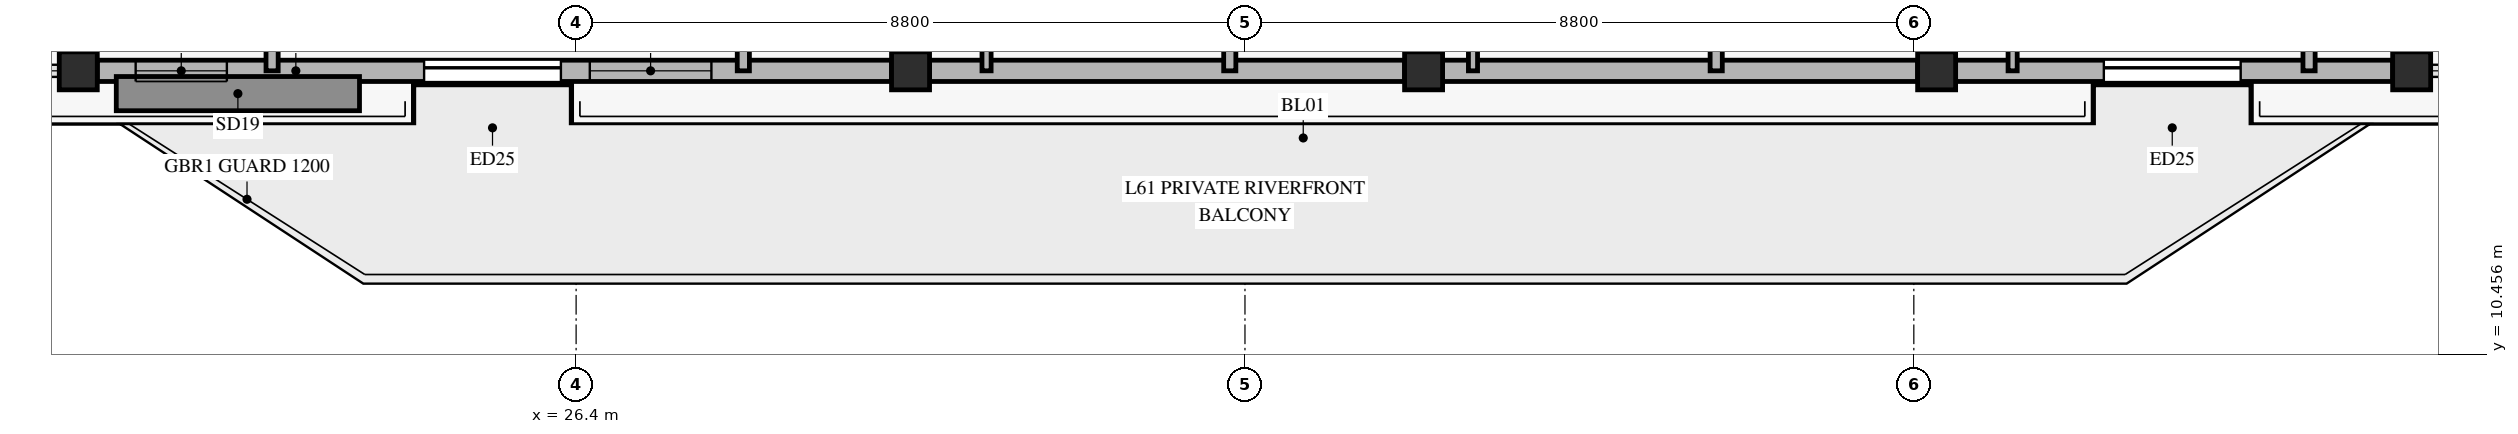
"""IFC4 building model, lengths in metres.
Left out: names, types, materials, properties, quantities, classifications, styles, units other than length and angle.
Written with IfcOpenShell. Run it as: python <this file> out.ifc"""

import sys

from ifc_helpers import new_model, si_unit, direction, frame, frame_2d, origin, origin_2d, place, context, subcontext, project, spatial, rectangle, hollow_rectangle, extrude, source, transform, mapped, element, fill, save


model = new_model("IFC4")
c1 = context("Model", 3, precision=1e-05, world=origin(), true_north=direction((0.0, 1.0)))
c2 = subcontext(c1, "Body", "Model", "MODEL_VIEW")
j1 = project(units=[si_unit("LENGTHUNIT", "METRE"), si_unit("PLANEANGLEUNIT", "RADIAN")], contexts=[c1])
p1 = place(None, origin())
s1 = spatial("IfcSite", under=j1, at=p1, CompositionType="ELEMENT")
p2 = place(p1, origin())
s2 = spatial("IfcBuilding", under=s1, at=p2, CompositionType="ELEMENT")
p3 = place(p2, frame((0.0, 0.0, 241.7)))
s3 = spatial("IfcBuildingStorey", under=s2, at=p3, CompositionType="ELEMENT", Elevation=241.7)
m1 = source(origin(), c2, "Body", "SweptSolid", [
    extrude(hollow_rectangle(XDim=0.5, YDim=0.5, WallThickness=0.024, at=origin_2d()), origin(), (0.0, 0.0, 1.0), 3.185),
])
for number, where, z_axis, x_axis in (
    (1, (19.85, 14.182, 0.0), (0.0, 0.0, 1.0), (1.0, 0.0, 0.0)),
    (2, (30.8, 14.182, 0.0), (0.0, 0.0, 1.0), (1.0, 0.0, 0.0)),
    (3, (37.55, 14.182, 0.0), (0.0, 0.0, 1.0), (1.0, 0.0, 0.0)),
    (4, (44.3, 14.182, 0.0), (0.0, 0.0, 1.0), (1.0, 0.0, 0.0)),
    (5, (50.55, 14.182, 0.0), (0.0, 0.0, 1.0), (1.0, 0.0, 0.0)),
):
    element("IfcColumn", number, at=place(p3, frame(where, z_axis=z_axis, x_axis=x_axis)), inside=s3, PredefinedType="COLUMN", context=c2, shape_type="MappedRepresentation", body=[
        mapped(m1, transform((0.0, 0.0, 0.0), x_axis=(1.0, 0.0, 0.0), y_axis=(0.0, 1.0, 0.0), z_axis=(0.0, 0.0, 1.0), scale=1.0)),
    ])
p4 = place(p3, frame((20.1, 14.182, 0.0), z_axis=(0.0, 0.0, 1.0), x_axis=(1.0, 0.0, 0.0)))
e6 = element("IfcWall", 6, at=p4, inside=s3, PredefinedType="SOLIDWALL", context=c2, shape_type="SweptSolid", body=[
    extrude(rectangle(XDim=10.45, YDim=0.28, at=frame_2d((5.225, 0.0))), origin(), (0.0, 0.0, 1.0), 2.815),
])
p5 = place(p4, frame((4.3, 0.0, 0.0)))
e7 = element("IfcOpeningElement", 7, at=p5, cuts=e6, PredefinedType="OPENING", context=c2, shape_type="SweptSolid", body=[
    extrude(rectangle(XDim=1.8, YDim=2.25, at=frame_2d((0.9, 1.125))), frame((0.0, 0.15, 0.0), z_axis=(0.0, -1.0, 0.0), x_axis=(1.0, 0.0, 0.0)), (0.0, 0.0, 1.0), 0.3),
])
p6 = place(p4, frame((0.505, 0.0, 0.45)))
e8 = element("IfcOpeningElement", 8, at=p6, cuts=e6, PredefinedType="OPENING", context=c2, shape_type="SweptSolid", body=[
    extrude(rectangle(XDim=1.2, YDim=2.0, at=frame_2d((0.6, 1.0))), frame((0.0, 0.15, 0.0), z_axis=(0.0, -1.0, 0.0), x_axis=(1.0, 0.0, 0.0)), (0.0, 0.0, 1.0), 0.3),
])
p7 = place(p4, frame((6.48, 0.0, 0.45)))
e9 = element("IfcOpeningElement", 9, at=p7, cuts=e6, PredefinedType="OPENING", context=c2, shape_type="SweptSolid", body=[
    extrude(rectangle(XDim=1.6, YDim=2.0, at=frame_2d((0.8, 1.0))), frame((0.0, 0.15, 0.0), z_axis=(0.0, -1.0, 0.0), x_axis=(1.0, 0.0, 0.0)), (0.0, 0.0, 1.0), 0.3),
])
for number, where, z_axis, x_axis in (
    (10, (31.05, 14.182, 0.0), (0.0, 0.0, 1.0), (1.0, 0.0, 0.0)),
    (11, (37.8, 14.182, 0.0), (0.0, 0.0, 1.0), (1.0, 0.0, 0.0)),
):
    element("IfcWall", number, at=place(p3, frame(where, z_axis=z_axis, x_axis=x_axis)), inside=s3, PredefinedType="SOLIDWALL", context=c2, shape_type="SweptSolid", body=[
        extrude(rectangle(XDim=6.25, YDim=0.28, at=frame_2d((3.125, 0.0))), origin(), (0.0, 0.0, 1.0), 2.815),
    ])
p8 = place(p3, frame((44.55, 14.182, 0.0), z_axis=(0.0, 0.0, 1.0), x_axis=(1.0, 0.0, 0.0)))
e12 = element("IfcWall", 12, at=p8, inside=s3, PredefinedType="SOLIDWALL", context=c2, shape_type="SweptSolid", body=[
    extrude(rectangle(XDim=5.75, YDim=0.28, at=frame_2d((2.875, 0.0))), origin(), (0.0, 0.0, 1.0), 2.815),
])
p9 = place(p8, frame((1.95, 0.0, 0.0)))
e13 = element("IfcOpeningElement", 13, at=p9, cuts=e12, PredefinedType="OPENING", context=c2, shape_type="SweptSolid", body=[
    extrude(rectangle(XDim=1.8, YDim=2.25, at=frame_2d((0.9, 1.125))), frame((0.0, 0.15, 0.0), z_axis=(0.0, -1.0, 0.0), x_axis=(1.0, 0.0, 0.0)), (0.0, 0.0, 1.0), 0.3),
])
for number, where, z_axis, x_axis in (
    (14, (22.4, 14.182, 0.0), (0.0, 0.0, 1.0), (0.0, 1.0, 0.0)),
    (15, (28.6, 14.182, 0.0), (0.0, 0.0, 1.0), (0.0, 1.0, 0.0)),
    (16, (35.0, 14.182, 0.0), (0.0, 0.0, 1.0), (0.0, 1.0, 0.0)),
    (17, (41.4, 14.182, 0.0), (0.0, 0.0, 1.0), (0.0, 1.0, 0.0)),
    (18, (49.2, 14.182, 0.0), (0.0, 0.0, 1.0), (0.0, 1.0, 0.0)),
):
    element("IfcWall", number, at=place(p3, frame(where, z_axis=z_axis, x_axis=x_axis)), inside=s3, PredefinedType="PARTITIONING", context=c2, shape_type="SweptSolid", body=[
        extrude(rectangle(XDim=19.968, YDim=0.16, at=frame_2d((9.984, 0.0))), origin(), (0.0, 0.0, 1.0), 2.77),
    ])
p10 = place(p3, frame((31.8, 14.182, 0.0), z_axis=(0.0, 0.0, 1.0), x_axis=(0.0, 1.0, 0.0)))
e19 = element("IfcWall", 19, at=p10, inside=s3, PredefinedType="PARTITIONING", context=c2, shape_type="SweptSolid", body=[
    extrude(rectangle(XDim=17.318, YDim=0.12, at=frame_2d((8.659, 0.0))), origin(), (0.0, 0.0, 1.0), 2.77),
])
p11 = place(p10, frame((1.59, 0.0, 0.0)))
e20 = element("IfcOpeningElement", 20, at=p11, cuts=e19, PredefinedType="OPENING", context=c2, shape_type="SweptSolid", body=[
    extrude(rectangle(XDim=0.95, YDim=2.1, at=frame_2d((0.475, 1.05))), frame((0.0, 0.07, 0.0), z_axis=(0.0, -1.0, 0.0), x_axis=(1.0, 0.0, 0.0)), (0.0, 0.0, 1.0), 0.14),
])
p12 = place(p10, frame((13.758, 0.0, 0.0)))
e21 = element("IfcOpeningElement", 21, at=p12, cuts=e19, PredefinedType="OPENING", context=c2, shape_type="SweptSolid", body=[
    extrude(rectangle(XDim=0.95, YDim=2.1, at=frame_2d((0.475, 1.05))), frame((0.0, 0.07, 0.0), z_axis=(0.0, -1.0, 0.0), x_axis=(1.0, 0.0, 0.0)), (0.0, 0.0, 1.0), 0.14),
])
p13 = place(p3, frame((38.2, 14.182, 0.0), z_axis=(0.0, 0.0, 1.0), x_axis=(0.0, 1.0, 0.0)))
e22 = element("IfcWall", 22, at=p13, inside=s3, PredefinedType="PARTITIONING", context=c2, shape_type="SweptSolid", body=[
    extrude(rectangle(XDim=17.318, YDim=0.12, at=frame_2d((8.659, 0.0))), origin(), (0.0, 0.0, 1.0), 2.77),
])
p14 = place(p13, frame((1.59, 0.0, 0.0)))
e23 = element("IfcOpeningElement", 23, at=p14, cuts=e22, PredefinedType="OPENING", context=c2, shape_type="SweptSolid", body=[
    extrude(rectangle(XDim=0.95, YDim=2.1, at=frame_2d((0.475, 1.05))), frame((0.0, 0.07, 0.0), z_axis=(0.0, -1.0, 0.0), x_axis=(1.0, 0.0, 0.0)), (0.0, 0.0, 1.0), 0.14),
])
p15 = place(p13, frame((13.758, 0.0, 0.0)))
e24 = element("IfcOpeningElement", 24, at=p15, cuts=e22, PredefinedType="OPENING", context=c2, shape_type="SweptSolid", body=[
    extrude(rectangle(XDim=0.95, YDim=2.1, at=frame_2d((0.475, 1.05))), frame((0.0, 0.07, 0.0), z_axis=(0.0, -1.0, 0.0), x_axis=(1.0, 0.0, 0.0)), (0.0, 0.0, 1.0), 0.14),
])
p16 = place(p3, frame((45.3, 14.182, 0.0), z_axis=(0.0, 0.0, 1.0), x_axis=(0.0, 1.0, 0.0)))
e25 = element("IfcWall", 25, at=p16, inside=s3, PredefinedType="PARTITIONING", context=c2, shape_type="SweptSolid", body=[
    extrude(rectangle(XDim=17.318, YDim=0.12, at=frame_2d((8.659, 0.0))), origin(), (0.0, 0.0, 1.0), 2.77),
])
p17 = place(p16, frame((3.87, 0.0, 0.0)))
e26 = element("IfcOpeningElement", 26, at=p17, cuts=e25, PredefinedType="OPENING", context=c2, shape_type="SweptSolid", body=[
    extrude(rectangle(XDim=0.95, YDim=2.1, at=frame_2d((0.475, 1.05))), frame((0.0, 0.07, 0.0), z_axis=(0.0, -1.0, 0.0), x_axis=(1.0, 0.0, 0.0)), (0.0, 0.0, 1.0), 0.14),
])
p18 = place(p16, frame((13.758, 0.0, 0.0)))
e27 = element("IfcOpeningElement", 27, at=p18, cuts=e25, PredefinedType="OPENING", context=c2, shape_type="SweptSolid", body=[
    extrude(rectangle(XDim=0.95, YDim=2.1, at=frame_2d((0.475, 1.05))), frame((0.0, 0.07, 0.0), z_axis=(0.0, -1.0, 0.0), x_axis=(1.0, 0.0, 0.0)), (0.0, 0.0, 1.0), 0.14),
])
m2 = source(origin(), c2, "Body", "SweptSolid", [
    extrude(rectangle(XDim=1.8, YDim=2.25, at=frame_2d((0.9, 1.125))), frame((0.0, 0.025, 0.0), z_axis=(0.0, -1.0, 0.0), x_axis=(1.0, 0.0, 0.0)), (0.0, 0.0, 1.0), 0.05),
])
p19 = place(p5, origin())
e28 = element("IfcDoor", 28, at=p19, inside=s3, OperationType="SLIDING_TO_LEFT", PredefinedType="DOOR", context=c2, shape_type="MappedRepresentation", body=[
    mapped(m2, transform((0.0, 0.0, 0.0), x_axis=(1.0, 0.0, 0.0), y_axis=(0.0, 1.0, 0.0), z_axis=(0.0, 0.0, 1.0), scale=1.0)),
])
fill(e7, e28)
m3 = source(origin(), c2, "Body", "SweptSolid", [
    extrude(rectangle(XDim=1.2, YDim=2.0, at=frame_2d((0.6, 1.0))), frame((0.0, 0.03, 0.0), z_axis=(0.0, -1.0, 0.0), x_axis=(1.0, 0.0, 0.0)), (0.0, 0.0, 1.0), 0.06),
])
p20 = place(p6, origin())
e29 = element("IfcWindow", 29, at=p20, inside=s3, PartitioningType="SINGLE_PANEL", PredefinedType="WINDOW", context=c2, shape_type="MappedRepresentation", body=[
    mapped(m3, transform((0.0, 0.0, 0.0), x_axis=(1.0, 0.0, 0.0), y_axis=(0.0, 1.0, 0.0), z_axis=(0.0, 0.0, 1.0), scale=1.0)),
])
fill(e8, e29)
m4 = source(origin(), c2, "Body", "SweptSolid", [
    extrude(rectangle(XDim=1.6, YDim=2.0, at=frame_2d((0.8, 1.0))), frame((0.0, 0.03, 0.0), z_axis=(0.0, -1.0, 0.0), x_axis=(1.0, 0.0, 0.0)), (0.0, 0.0, 1.0), 0.06),
])
p21 = place(p7, origin())
e30 = element("IfcWindow", 30, at=p21, inside=s3, PartitioningType="SINGLE_PANEL", PredefinedType="WINDOW", context=c2, shape_type="MappedRepresentation", body=[
    mapped(m4, transform((0.0, 0.0, 0.0), x_axis=(1.0, 0.0, 0.0), y_axis=(0.0, 1.0, 0.0), z_axis=(0.0, 0.0, 1.0), scale=1.0)),
])
fill(e9, e30)
p22 = place(p9, origin())
e31 = element("IfcDoor", 31, at=p22, inside=s3, OperationType="SLIDING_TO_LEFT", PredefinedType="DOOR", context=c2, shape_type="MappedRepresentation", body=[
    mapped(m2, transform((0.0, 0.0, 0.0), x_axis=(1.0, 0.0, 0.0), y_axis=(0.0, 1.0, 0.0), z_axis=(0.0, 0.0, 1.0), scale=1.0)),
])
fill(e13, e31)
save(model, sys.argv[1])
